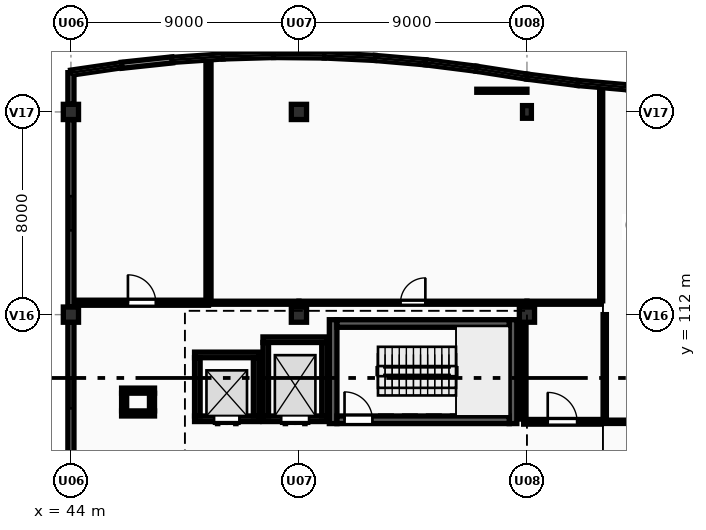
"""IFC4 building model, lengths in metres.
Left out: names, types, materials, properties, quantities, classifications, styles, units other than length and angle.
Written with IfcOpenShell. Run it as: python <this file> out.ifc"""

import sys

from ifc_helpers import new_model, si_unit, direction, frame, frame_2d, origin, origin_2d, place, context, subcontext, project, spatial, rectangle, extrude, element, fill, save


model = new_model("IFC4")
c1 = context("Model", 3, precision=1e-05, world=origin(), true_north=direction((0.0, 1.0)))
c2 = subcontext(c1, "Body", "Model", "MODEL_VIEW")
j1 = project(units=[si_unit("LENGTHUNIT", "METRE"), si_unit("PLANEANGLEUNIT", "RADIAN")], contexts=[c1])
p1 = place(None, origin())
s1 = spatial("IfcSite", under=j1, at=p1, CompositionType="ELEMENT")
p2 = place(p1, origin())
s2 = spatial("IfcBuilding", under=s1, at=p2, CompositionType="ELEMENT")
p3 = place(p2, origin())
s3 = spatial("IfcBuildingStorey", under=s2, at=p3, CompositionType="ELEMENT", Elevation=0.0)
for number, where, z_axis, x_axis in (
    (1, (44.0, 112.0, -0.2), (0.0, 0.0, 1.0), (1.0, 0.0, 0.0)),
    (2, (44.0, 120.0, -0.2), (0.0, 0.0, 1.0), (1.0, 0.0, 0.0)),
    (3, (53.0, 112.0, -0.2), (0.0, 0.0, 1.0), (1.0, 0.0, 0.0)),
    (4, (53.0, 120.0, -0.2), (0.0, 0.0, 1.0), (1.0, 0.0, 0.0)),
    (5, (62.0, 112.0, -0.2), (0.0, 0.0, 1.0), (1.0, 0.0, 0.0)),
):
    element("IfcColumn", number, at=place(p3, frame(where, z_axis=z_axis, x_axis=x_axis)), inside=s3, PredefinedType="COLUMN", context=c2, shape_type="SweptSolid", body=[
        extrude(rectangle(XDim=0.6, YDim=0.6, at=origin_2d()), origin(), (0.0, 0.0, 1.0), 4.7),
    ])
p4 = place(p3, frame((62.0, 120.0, -0.2), z_axis=(0.0, 0.0, 1.0), x_axis=(1.0, 0.0, 0.0)))
e6 = element("IfcColumn", 6, at=p4, inside=s3, PredefinedType="PILASTER", context=c2, shape_type="SweptSolid", body=[
    extrude(rectangle(XDim=0.35, YDim=0.5, at=origin_2d()), origin(), (0.0, 0.0, 1.0), 4.7),
])
p5 = place(p3, frame((44.0, 121.55, 0.0), z_axis=(0.0, 0.0, 1.0), x_axis=(0.989544477223, 0.144228040259, 0.0)))
e7 = element("IfcWall", 7, at=p5, inside=s3, PredefinedType="SOLIDWALL", context=c2, shape_type="SweptSolid", body=[
    extrude(rectangle(XDim=2.021, YDim=0.2, at=frame_2d((1.011, 0.0))), origin(), (0.0, 0.0, 1.0), 0.95),
])
p6 = place(p3, frame((46.0, 121.842, 0.0), z_axis=(0.0, 0.0, 1.0), x_axis=(0.994395160059, 0.105727317433, 0.0)))
e8 = element("IfcWall", 8, at=p6, inside=s3, PredefinedType="SOLIDWALL", context=c2, shape_type="SweptSolid", body=[
    extrude(rectangle(XDim=2.011, YDim=0.24, at=frame_2d((1.006, 0.0))), origin(), (0.0, 0.0, 1.0), 4.24),
])
p7 = place(p3, frame((48.0, 122.054, 0.0), z_axis=(0.0, 0.0, 1.0), x_axis=(0.997729302978, 0.067351599676, 0.0)))
e9 = element("IfcWall", 9, at=p7, inside=s3, PredefinedType="SOLIDWALL", context=c2, shape_type="SweptSolid", body=[
    extrude(rectangle(XDim=2.005, YDim=0.2, at=frame_2d((1.002, 0.0))), origin(), (0.0, 0.0, 1.0), 0.95),
])
p8 = place(p3, frame((50.0, 122.189, 0.0), z_axis=(0.0, 0.0, 1.0), x_axis=(0.999581770858, 0.028918564416, 0.0)))
e10 = element("IfcWall", 10, at=p8, inside=s3, PredefinedType="SOLIDWALL", context=c2, shape_type="SweptSolid", body=[
    extrude(rectangle(XDim=2.001, YDim=0.2, at=frame_2d((1.0, 0.0))), origin(), (0.0, 0.0, 1.0), 0.95),
])
p9 = place(p3, frame((52.0, 122.247, 0.0), z_axis=(0.0, 0.0, 1.0), x_axis=(0.999953504169, -0.009643106302, 0.0)))
e11 = element("IfcWall", 11, at=p9, inside=s3, PredefinedType="SOLIDWALL", context=c2, shape_type="SweptSolid", body=[
    extrude(rectangle(XDim=2.0, YDim=0.2, at=frame_2d((1.0, 0.0))), origin(), (0.0, 0.0, 1.0), 0.95),
])
p10 = place(p3, frame((54.0, 122.228, 0.0), z_axis=(0.0, 0.0, 1.0), x_axis=(0.99884540439, -0.048040172037, 0.0)))
e12 = element("IfcWall", 12, at=p10, inside=s3, PredefinedType="SOLIDWALL", context=c2, shape_type="SweptSolid", body=[
    extrude(rectangle(XDim=2.002, YDim=0.2, at=frame_2d((1.001, 0.0))), origin(), (0.0, 0.0, 1.0), 0.95),
])
p11 = place(p3, frame((56.0, 122.132, 0.0), z_axis=(0.0, 0.0, 1.0), x_axis=(0.996244237948, -0.086587633962, 0.0)))
e13 = element("IfcWall", 13, at=p11, inside=s3, PredefinedType="SOLIDWALL", context=c2, shape_type="SweptSolid", body=[
    extrude(rectangle(XDim=2.008, YDim=0.2, at=frame_2d((1.004, 0.0))), origin(), (0.0, 0.0, 1.0), 0.95),
])
p12 = place(p3, frame((58.0, 121.958, 0.0), z_axis=(0.0, 0.0, 1.0), x_axis=(0.992158168336, -0.124988675503, 0.0)))
e14 = element("IfcWall", 14, at=p12, inside=s3, PredefinedType="SOLIDWALL", context=c2, shape_type="SweptSolid", body=[
    extrude(rectangle(XDim=2.016, YDim=0.2, at=frame_2d((1.008, 0.0))), origin(), (0.0, 0.0, 1.0), 0.95),
])
p13 = place(p3, frame((60.0, 121.706, 0.0), z_axis=(0.0, 0.0, 1.0), x_axis=(0.988085509852, -0.153905897287, 0.0)))
e15 = element("IfcWall", 15, at=p13, inside=s3, PredefinedType="SOLIDWALL", context=c2, shape_type="SweptSolid", body=[
    extrude(rectangle(XDim=2.024, YDim=0.2, at=frame_2d((1.012, 0.0))), origin(), (0.0, 0.0, 1.0), 0.95),
])
p14 = place(p3, frame((62.0, 121.394, 0.0), z_axis=(0.0, 0.0, 1.0), x_axis=(0.992158168336, -0.124988675503, 0.0)))
e16 = element("IfcWall", 16, at=p14, inside=s3, PredefinedType="SOLIDWALL", context=c2, shape_type="SweptSolid", body=[
    extrude(rectangle(XDim=2.016, YDim=0.2, at=frame_2d((1.008, 0.0))), origin(), (0.0, 0.0, 1.0), 0.95),
])
p15 = place(p3, frame((64.0, 121.142, 0.0), z_axis=(0.0, 0.0, 1.0), x_axis=(0.996244237948, -0.086587633962, 0.0)))
e17 = element("IfcWall", 17, at=p15, inside=s3, PredefinedType="SOLIDWALL", context=c2, shape_type="SweptSolid", body=[
    extrude(rectangle(XDim=2.008, YDim=0.2, at=frame_2d((1.004, 0.0))), origin(), (0.0, 0.0, 1.0), 0.95),
])
p16 = place(p3, frame((44.0, 104.3, 0.0), z_axis=(0.0, 0.0, 1.0), x_axis=(0.0, 1.0, 0.0)))
e18 = element("IfcWall", 18, at=p16, inside=s3, PredefinedType="SOLIDWALL", context=c2, shape_type="SweptSolid", body=[
    extrude(rectangle(XDim=7.4, YDim=0.24, at=frame_2d((3.7, 0.0))), origin(), (0.0, 0.0, 1.0), 3.54),
])
p17 = place(p16, frame((4.0, 0.0, 0.95)))
e19 = element("IfcOpeningElement", 19, at=p17, cuts=e18, PredefinedType="OPENING", context=c2, shape_type="SweptSolid", body=[
    extrude(rectangle(XDim=1.2, YDim=1.5, at=frame_2d((0.6, 0.75))), frame((0.0, 0.13, 0.0), z_axis=(0.0, -1.0, 0.0), x_axis=(1.0, 0.0, 0.0)), (0.0, 0.0, 1.0), 0.26),
])
p18 = place(p3, frame((44.0, 112.3, 0.0), z_axis=(0.0, 0.0, 1.0), x_axis=(0.0, 1.0, 0.0)))
e20 = element("IfcWall", 20, at=p18, inside=s3, PredefinedType="SOLIDWALL", context=c2, shape_type="SweptSolid", body=[
    extrude(rectangle(XDim=7.4, YDim=0.24, at=frame_2d((3.7, 0.0))), origin(), (0.0, 0.0, 1.0), 3.54),
])
p19 = place(p18, frame((3.025, 0.0, 0.95)))
e21 = element("IfcOpeningElement", 21, at=p19, cuts=e20, PredefinedType="OPENING", context=c2, shape_type="SweptSolid", body=[
    extrude(rectangle(XDim=1.35, YDim=1.5, at=frame_2d((0.675, 0.75))), frame((0.0, 0.13, 0.0), z_axis=(0.0, -1.0, 0.0), x_axis=(1.0, 0.0, 0.0)), (0.0, 0.0, 1.0), 0.26),
])
p20 = place(p3, frame((44.0, 120.3, 0.0), z_axis=(0.0, 0.0, 1.0), x_axis=(0.0, 1.0, 0.0)))
e22 = element("IfcWall", 22, at=p20, inside=s3, PredefinedType="SOLIDWALL", context=c2, shape_type="SweptSolid", body=[
    extrude(rectangle(XDim=1.25, YDim=0.24, at=frame_2d((0.625, 0.0))), origin(), (0.0, 0.0, 1.0), 3.54),
])
for number, where, z_axis, x_axis in (
    (23, (54.35, 107.7, 0.0), (0.0, 0.0, 1.0), (0.0, 1.0, 0.0)),
    (24, (61.45, 111.8, 0.0), (0.0, 0.0, 1.0), (0.0, -1.0, 0.0)),
):
    element("IfcWall", number, at=place(p3, frame(where, z_axis=z_axis, x_axis=x_axis)), inside=s3, PredefinedType="SHEAR", context=c2, shape_type="SweptSolid", body=[
        extrude(rectangle(XDim=4.1, YDim=0.3, at=frame_2d((2.05, 0.0))), origin(), (0.0, 0.0, 1.0), 4.24),
    ])
p21 = place(p3, frame((54.5, 107.85, 0.0), z_axis=(0.0, 0.0, 1.0), x_axis=(1.0, 0.0, 0.0)))
e25 = element("IfcWall", 25, at=p21, inside=s3, PredefinedType="SHEAR", context=c2, shape_type="SweptSolid", body=[
    extrude(rectangle(XDim=6.8, YDim=0.3, at=frame_2d((3.4, 0.0))), origin(), (0.0, 0.0, 1.0), 4.24),
])
p22 = place(p21, frame((0.3, 0.0, 0.0)))
e26 = element("IfcOpeningElement", 26, at=p22, cuts=e25, PredefinedType="OPENING", context=c2, shape_type="SweptSolid", body=[
    extrude(rectangle(XDim=1.1, YDim=2.15, at=frame_2d((0.55, 1.075))), frame((0.0, 0.16, 0.0), z_axis=(0.0, -1.0, 0.0), x_axis=(1.0, 0.0, 0.0)), (0.0, 0.0, 1.0), 0.32),
])
p23 = place(p3, frame((61.3, 111.65, 0.0), z_axis=(0.0, 0.0, 1.0), x_axis=(-1.0, 0.0, 0.0)))
e27 = element("IfcWall", 27, at=p23, inside=s3, PredefinedType="SHEAR", context=c2, shape_type="SweptSolid", body=[
    extrude(rectangle(XDim=6.8, YDim=0.3, at=frame_2d((3.4, 0.0))), origin(), (0.0, 0.0, 1.0), 4.24),
])
p24 = place(p3, frame((54.12, 107.89, 0.0), z_axis=(0.0, 0.0, 1.0), x_axis=(-1.0, 0.0, 0.0)))
e28 = element("IfcWall", 28, at=p24, inside=s3, PredefinedType="SHEAR", context=c2, shape_type="SweptSolid", body=[
    extrude(rectangle(XDim=2.54, YDim=0.22, at=frame_2d((1.27, 0.0))), origin(), (0.0, 0.0, 1.0), 4.24),
])
p25 = place(p24, frame((0.72, 0.0, 0.0)))
e29 = element("IfcOpeningElement", 29, at=p25, cuts=e28, PredefinedType="OPENING", context=c2, shape_type="SweptSolid", body=[
    extrude(rectangle(XDim=1.1, YDim=2.15, at=frame_2d((0.55, 1.075))), frame((0.0, 0.12, 0.0), z_axis=(0.0, -1.0, 0.0), x_axis=(1.0, 0.0, 0.0)), (0.0, 0.0, 1.0), 0.24),
])
p26 = place(p3, frame((51.58, 111.01, 0.0), z_axis=(0.0, 0.0, 1.0), x_axis=(1.0, 0.0, 0.0)))
e30 = element("IfcWall", 30, at=p26, inside=s3, PredefinedType="SHEAR", context=c2, shape_type="SweptSolid", body=[
    extrude(rectangle(XDim=2.54, YDim=0.22, at=frame_2d((1.27, 0.0))), origin(), (0.0, 0.0, 1.0), 4.24),
])
for number, where, z_axis, x_axis in (
    (31, (51.69, 108.0, 0.0), (0.0, 0.0, 1.0), (0.0, 1.0, 0.0)),
    (32, (54.01, 110.9, 0.0), (0.0, 0.0, 1.0), (0.0, -1.0, 0.0)),
):
    element("IfcWall", number, at=place(p3, frame(where, z_axis=z_axis, x_axis=x_axis)), inside=s3, PredefinedType="SHEAR", context=c2, shape_type="SweptSolid", body=[
        extrude(rectangle(XDim=2.9, YDim=0.22, at=frame_2d((1.45, 0.0))), origin(), (0.0, 0.0, 1.0), 4.24),
    ])
p27 = place(p3, frame((51.42, 107.89, 0.0), z_axis=(0.0, 0.0, 1.0), x_axis=(-1.0, 0.0, 0.0)))
e33 = element("IfcWall", 33, at=p27, inside=s3, PredefinedType="SHEAR", context=c2, shape_type="SweptSolid", body=[
    extrude(rectangle(XDim=2.54, YDim=0.22, at=frame_2d((1.27, 0.0))), origin(), (0.0, 0.0, 1.0), 4.24),
])
p28 = place(p27, frame((0.77, 0.0, 0.0)))
e34 = element("IfcOpeningElement", 34, at=p28, cuts=e33, PredefinedType="OPENING", context=c2, shape_type="SweptSolid", body=[
    extrude(rectangle(XDim=1.0, YDim=2.15, at=frame_2d((0.5, 1.075))), frame((0.0, 0.12, 0.0), z_axis=(0.0, -1.0, 0.0), x_axis=(1.0, 0.0, 0.0)), (0.0, 0.0, 1.0), 0.24),
])
p29 = place(p3, frame((48.88, 110.41, 0.0), z_axis=(0.0, 0.0, 1.0), x_axis=(1.0, 0.0, 0.0)))
e35 = element("IfcWall", 35, at=p29, inside=s3, PredefinedType="SHEAR", context=c2, shape_type="SweptSolid", body=[
    extrude(rectangle(XDim=2.54, YDim=0.22, at=frame_2d((1.27, 0.0))), origin(), (0.0, 0.0, 1.0), 4.24),
])
for number, where, z_axis, x_axis in (
    (36, (48.99, 108.0, 0.0), (0.0, 0.0, 1.0), (0.0, 1.0, 0.0)),
    (37, (51.31, 110.3, 0.0), (0.0, 0.0, 1.0), (0.0, -1.0, 0.0)),
):
    element("IfcWall", number, at=place(p3, frame(where, z_axis=z_axis, x_axis=x_axis)), inside=s3, PredefinedType="SHEAR", context=c2, shape_type="SweptSolid", body=[
        extrude(rectangle(XDim=2.3, YDim=0.22, at=frame_2d((1.15, 0.0))), origin(), (0.0, 0.0, 1.0), 4.24),
    ])
for number, where, z_axis, x_axis in (
    (38, (47.3, 108.1, 0.0), (0.0, 0.0, 1.0), (-1.0, 0.0, 0.0)),
    (39, (46.0, 109.0, 0.0), (0.0, 0.0, 1.0), (1.0, 0.0, 0.0)),
):
    element("IfcWall", number, at=place(p3, frame(where, z_axis=z_axis, x_axis=x_axis)), inside=s3, PredefinedType="PARTITIONING", context=c2, shape_type="SweptSolid", body=[
        extrude(rectangle(XDim=1.3, YDim=0.2, at=frame_2d((0.65, 0.0))), origin(), (0.0, 0.0, 1.0), 4.24),
    ])
p30 = place(p3, frame((46.1, 108.2, 0.0), z_axis=(0.0, 0.0, 1.0), x_axis=(0.0, 1.0, 0.0)))
e40 = element("IfcWall", 40, at=p30, inside=s3, PredefinedType="PARTITIONING", context=c2, shape_type="SweptSolid", body=[
    extrude(rectangle(XDim=0.7, YDim=0.2, at=frame_2d((0.35, 0.0))), origin(), (0.0, 0.0, 1.0), 4.24),
])
p31 = place(p3, frame((47.2, 108.9, 0.0), z_axis=(0.0, 0.0, 1.0), x_axis=(0.0, -1.0, 0.0)))
e41 = element("IfcWall", 41, at=p31, inside=s3, PredefinedType="PARTITIONING", context=c2, shape_type="SweptSolid", body=[
    extrude(rectangle(XDim=0.7, YDim=0.2, at=frame_2d((0.35, 0.0))), origin(), (0.0, 0.0, 1.0), 3.84),
])
p32 = place(p3, frame((44.162, 112.47, 0.0), z_axis=(0.0, 0.0, 1.0), x_axis=(1.0, 0.0, 0.0)))
e42 = element("IfcWall", 42, at=p32, inside=s3, PredefinedType="PARTITIONING", context=c2, shape_type="SweptSolid", body=[
    extrude(rectangle(XDim=5.268, YDim=0.2, at=frame_2d((2.634, 0.0))), origin(), (0.0, 0.0, 1.0), 3.44),
])
p33 = place(p32, frame((2.088, 0.0, 0.0)))
e43 = element("IfcOpeningElement", 43, at=p33, cuts=e42, PredefinedType="OPENING", context=c2, shape_type="SweptSolid", body=[
    extrude(rectangle(XDim=1.1, YDim=2.15, at=frame_2d((0.55, 1.075))), frame((0.0, 0.11, 0.0), z_axis=(0.0, -1.0, 0.0), x_axis=(1.0, 0.0, 0.0)), (0.0, 0.0, 1.0), 0.22),
])
p34 = place(p3, frame((49.43, 112.585, 0.0), z_axis=(0.0, 0.0, 1.0), x_axis=(0.0, 1.0, 0.0)))
e44 = element("IfcWall", 44, at=p34, inside=s3, PredefinedType="PARTITIONING", context=c2, shape_type="SweptSolid", body=[
    extrude(rectangle(XDim=9.424, YDim=0.2, at=frame_2d((4.712, 0.0))), origin(), (0.0, 0.0, 1.0), 4.24),
])
p35 = place(p3, frame((49.57, 112.47, 0.0), z_axis=(0.0, 0.0, 1.0), x_axis=(1.0, 0.0, 0.0)))
e45 = element("IfcWall", 45, at=p35, inside=s3, PredefinedType="PARTITIONING", context=c2, shape_type="SweptSolid", body=[
    extrude(rectangle(XDim=3.43, YDim=0.12, at=frame_2d((1.715, 0.0))), origin(), (0.0, 0.0, 1.0), 3.44),
])
p36 = place(p3, frame((53.0, 112.47, 0.0), z_axis=(0.0, 0.0, 1.0), x_axis=(1.0, 0.0, 0.0)))
e46 = element("IfcWall", 46, at=p36, inside=s3, PredefinedType="PARTITIONING", context=c2, shape_type="SweptSolid", body=[
    extrude(rectangle(XDim=9.0, YDim=0.12, at=frame_2d((4.5, 0.0))), origin(), (0.0, 0.0, 1.0), 4.24),
])
p37 = place(p36, frame((4.01, 0.0, 0.0)))
e47 = element("IfcOpeningElement", 47, at=p37, cuts=e46, PredefinedType="OPENING", context=c2, shape_type="SweptSolid", body=[
    extrude(rectangle(XDim=0.98, YDim=2.1, at=frame_2d((0.49, 1.05))), frame((0.0, 0.07, 0.0), z_axis=(0.0, -1.0, 0.0), x_axis=(1.0, 0.0, 0.0)), (0.0, 0.0, 1.0), 0.14),
])
p38 = place(p3, frame((62.0, 112.47, 0.0), z_axis=(0.0, 0.0, 1.0), x_axis=(1.0, 0.0, 0.0)))
e48 = element("IfcWall", 48, at=p38, inside=s3, PredefinedType="PARTITIONING", context=c2, shape_type="SweptSolid", body=[
    extrude(rectangle(XDim=2.93, YDim=0.12, at=frame_2d((1.465, 0.0))), origin(), (0.0, 0.0, 1.0), 4.24),
])
p39 = place(p3, frame((60.02, 120.836, 0.0), z_axis=(0.0, 0.0, 1.0), x_axis=(1.0, 0.0, 0.0)))
e49 = element("IfcWall", 49, at=p39, inside=s3, PredefinedType="PARTITIONING", context=c2, shape_type="SweptSolid", body=[
    extrude(rectangle(XDim=1.98, YDim=0.12, at=frame_2d((0.99, 0.0))), origin(), (0.0, 0.0, 1.0), 4.24),
])
p40 = place(p3, frame((64.93, 112.545, 0.0), z_axis=(0.0, 0.0, 1.0), x_axis=(0.0, 1.0, 0.0)))
e50 = element("IfcWall", 50, at=p40, inside=s3, PredefinedType="PARTITIONING", context=c2, shape_type="SweptSolid", body=[
    extrude(rectangle(XDim=8.375, YDim=0.12, at=frame_2d((4.187, 0.0))), origin(), (0.0, 0.0, 1.0), 4.24),
])
p41 = place(p3, frame((65.07, 107.77, 0.0), z_axis=(0.0, 0.0, 1.0), x_axis=(1.0, 0.0, 0.0)))
e51 = element("IfcWall", 51, at=p41, inside=s3, PredefinedType="PARTITIONING", context=c2, shape_type="SweptSolid", body=[
    extrude(rectangle(XDim=9.36, YDim=0.13, at=frame_2d((4.68, 0.0))), origin(), (0.0, 0.0, 1.0), 4.24),
])
p42 = place(p41, frame((3.92, 0.0, 0.0)))
e52 = element("IfcOpeningElement", 52, at=p42, cuts=e51, PredefinedType="OPENING", context=c2, shape_type="SweptSolid", body=[
    extrude(rectangle(XDim=1.02, YDim=2.1, at=frame_2d((0.51, 1.05))), frame((0.0, 0.075, 0.0), z_axis=(0.0, -1.0, 0.0), x_axis=(1.0, 0.0, 0.0)), (0.0, 0.0, 1.0), 0.15),
])
p43 = place(p3, frame((65.07, 107.85, 0.0), z_axis=(0.0, 0.0, 1.0), x_axis=(0.0, 1.0, 0.0)))
e53 = element("IfcWall", 53, at=p43, inside=s3, PredefinedType="PARTITIONING", context=c2, shape_type="SweptSolid", body=[
    extrude(rectangle(XDim=4.15, YDim=0.13, at=frame_2d((2.075, 0.0))), origin(), (0.0, 0.0, 1.0), 4.24),
])
p44 = place(p3, frame((61.87, 107.77, 0.0), z_axis=(0.0, 0.0, 1.0), x_axis=(1.0, 0.0, 0.0)))
e54 = element("IfcWall", 54, at=p44, inside=s3, PredefinedType="PARTITIONING", context=c2, shape_type="SweptSolid", body=[
    extrude(rectangle(XDim=3.06, YDim=0.185, at=frame_2d((1.53, 0.0))), origin(), (0.0, 0.0, 1.0), 4.24),
])
p45 = place(p44, frame((0.95, 0.0, 0.0)))
e55 = element("IfcOpeningElement", 55, at=p45, cuts=e54, PredefinedType="OPENING", context=c2, shape_type="SweptSolid", body=[
    extrude(rectangle(XDim=1.16, YDim=2.15, at=frame_2d((0.58, 1.075))), frame((0.0, 0.103, 0.0), z_axis=(0.0, -1.0, 0.0), x_axis=(1.0, 0.0, 0.0)), (0.0, 0.0, 1.0), 0.205),
])
p46 = place(p3, frame((61.87, 107.877, 0.0), z_axis=(0.0, 0.0, 1.0), x_axis=(0.0, 1.0, 0.0)))
e56 = element("IfcWall", 56, at=p46, inside=s3, PredefinedType="PARTITIONING", context=c2, shape_type="SweptSolid", body=[
    extrude(rectangle(XDim=3.808, YDim=0.185, at=frame_2d((1.904, 0.0))), origin(), (0.0, 0.0, 1.0), 4.24),
])
p47 = place(p17, origin())
e57 = element("IfcWindow", 57, at=p47, inside=s3, PartitioningType="SINGLE_PANEL", PredefinedType="WINDOW", context=c2, shape_type="SweptSolid", body=[
    extrude(rectangle(XDim=1.2, YDim=1.5, at=frame_2d((0.6, 0.75))), frame((0.0, 0.03, 0.0), z_axis=(0.0, -1.0, 0.0), x_axis=(1.0, 0.0, 0.0)), (0.0, 0.0, 1.0), 0.06),
])
fill(e19, e57)
p48 = place(p19, origin())
e58 = element("IfcWindow", 58, at=p48, inside=s3, PartitioningType="SINGLE_PANEL", PredefinedType="WINDOW", context=c2, shape_type="SweptSolid", body=[
    extrude(rectangle(XDim=1.35, YDim=1.5, at=frame_2d((0.675, 0.75))), frame((0.0, 0.03, 0.0), z_axis=(0.0, -1.0, 0.0), x_axis=(1.0, 0.0, 0.0)), (0.0, 0.0, 1.0), 0.06),
])
fill(e21, e58)
p49 = place(p22, origin())
e59 = element("IfcDoor", 59, at=p49, inside=s3, OperationType="SINGLE_SWING_LEFT", PredefinedType="DOOR", context=c2, shape_type="SweptSolid", body=[
    extrude(rectangle(XDim=1.1, YDim=2.15, at=frame_2d((0.55, 1.075))), frame((0.0, 0.025, 0.0), z_axis=(0.0, -1.0, 0.0), x_axis=(1.0, 0.0, 0.0)), (0.0, 0.0, 1.0), 0.05),
])
fill(e26, e59)
p50 = place(p25, origin())
e60 = element("IfcDoor", 60, at=p50, inside=s3, OperationType="DOUBLE_DOOR_SLIDING", PredefinedType="DOOR", context=c2, shape_type="SweptSolid", body=[
    extrude(rectangle(XDim=1.1, YDim=2.15, at=frame_2d((0.55, 1.075))), frame((0.0, 0.025, 0.0), z_axis=(0.0, -1.0, 0.0), x_axis=(1.0, 0.0, 0.0)), (0.0, 0.0, 1.0), 0.05),
])
fill(e29, e60)
p51 = place(p28, origin())
e61 = element("IfcDoor", 61, at=p51, inside=s3, OperationType="DOUBLE_DOOR_SLIDING", PredefinedType="DOOR", context=c2, shape_type="SweptSolid", body=[
    extrude(rectangle(XDim=1.0, YDim=2.15, at=frame_2d((0.5, 1.075))), frame((0.0, 0.025, 0.0), z_axis=(0.0, -1.0, 0.0), x_axis=(1.0, 0.0, 0.0)), (0.0, 0.0, 1.0), 0.05),
])
fill(e34, e61)
p52 = place(p33, origin())
e62 = element("IfcDoor", 62, at=p52, inside=s3, OperationType="SINGLE_SWING_LEFT", PredefinedType="DOOR", context=c2, shape_type="SweptSolid", body=[
    extrude(rectangle(XDim=1.1, YDim=2.15, at=frame_2d((0.55, 1.075))), frame((0.0, 0.025, 0.0), z_axis=(0.0, -1.0, 0.0), x_axis=(1.0, 0.0, 0.0)), (0.0, 0.0, 1.0), 0.05),
])
fill(e43, e62)
p53 = place(p37, origin())
e63 = element("IfcDoor", 63, at=p53, inside=s3, OperationType="SINGLE_SWING_RIGHT", PredefinedType="DOOR", context=c2, shape_type="SweptSolid", body=[
    extrude(rectangle(XDim=0.98, YDim=2.1, at=frame_2d((0.49, 1.05))), frame((0.0, 0.025, 0.0), z_axis=(0.0, -1.0, 0.0), x_axis=(1.0, 0.0, 0.0)), (0.0, 0.0, 1.0), 0.05),
])
fill(e47, e63)
p54 = place(p45, origin())
e64 = element("IfcDoor", 64, at=p54, inside=s3, OperationType="SINGLE_SWING_LEFT", PredefinedType="DOOR", context=c2, shape_type="SweptSolid", body=[
    extrude(rectangle(XDim=1.16, YDim=2.15, at=frame_2d((0.58, 1.075))), frame((0.0, 0.025, 0.0), z_axis=(0.0, -1.0, 0.0), x_axis=(1.0, 0.0, 0.0)), (0.0, 0.0, 1.0), 0.05),
])
fill(e55, e64)
save(model, sys.argv[1])
